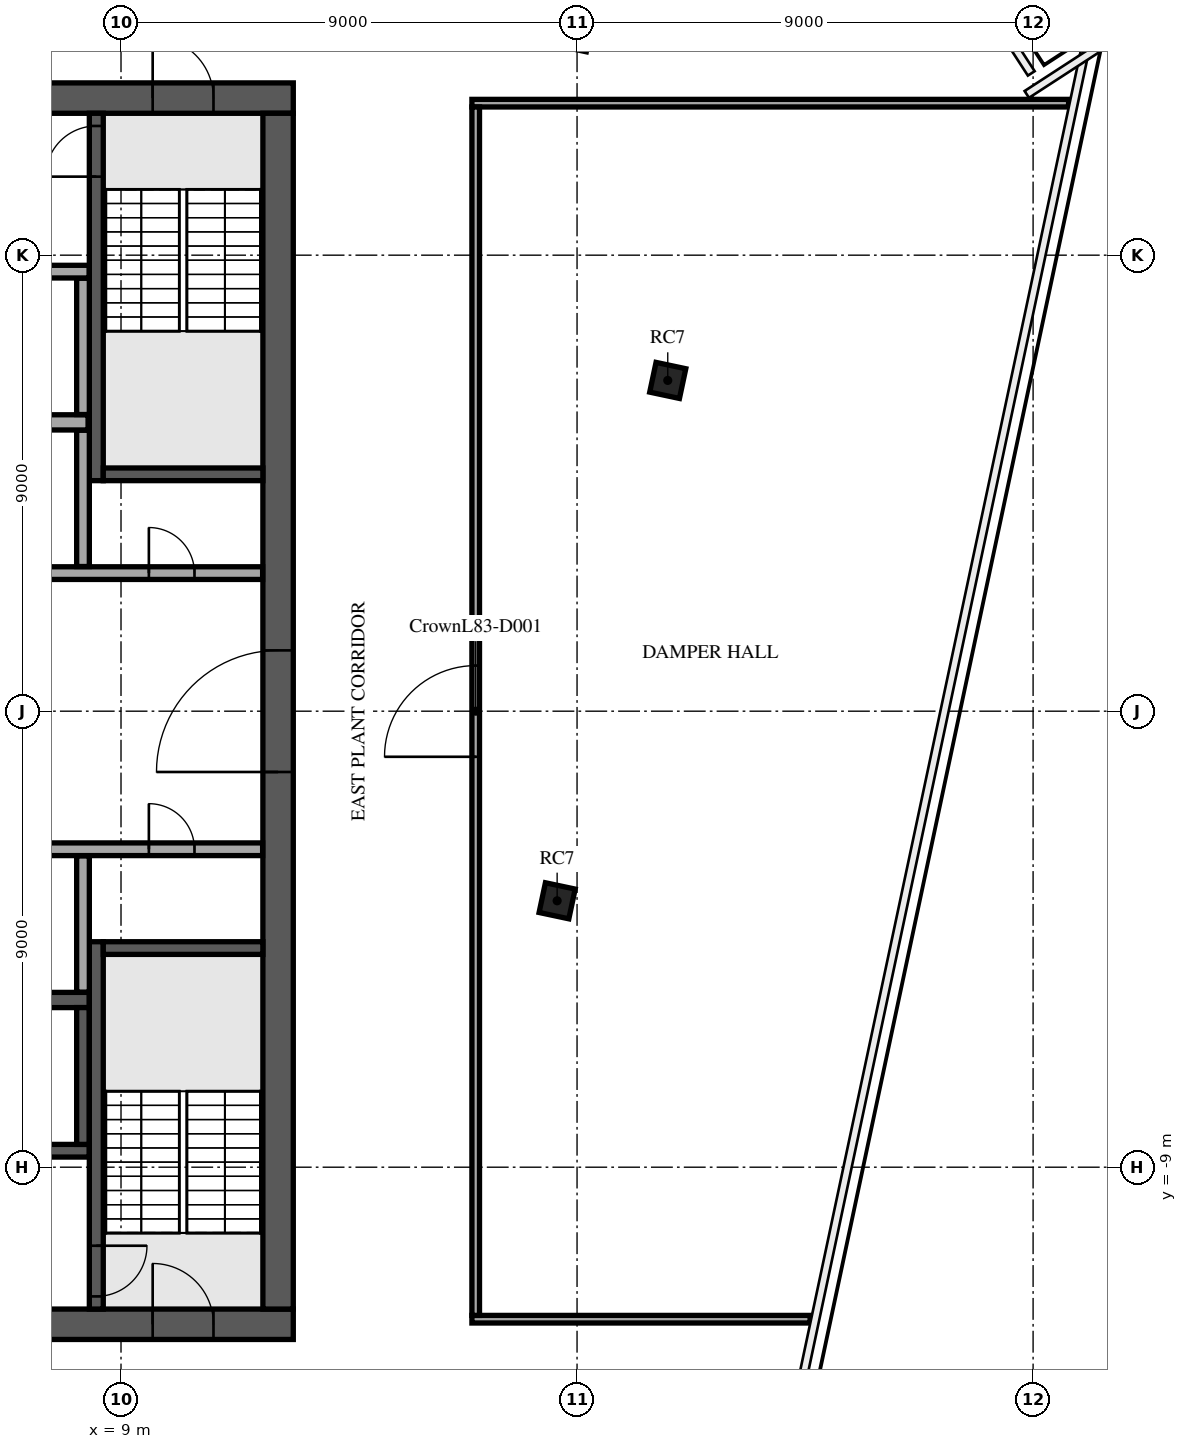
"""IFC4 building model, lengths in metres.
Left out: names, types, materials, properties, quantities, classifications, styles, units other than length and angle.
Written with IfcOpenShell. Run it as: python <this file> out.ifc"""

import sys

from ifc_helpers import new_model, si_unit, direction, frame, frame_2d, origin, origin_2d, place, context, subcontext, project, spatial, rectangle, extrude, element, fill, save


model = new_model("IFC4")
c1 = context("Model", 3, precision=1e-05, world=origin(), true_north=direction((0.0, 1.0)))
c2 = subcontext(c1, "Body", "Model", "MODEL_VIEW")
j1 = project(units=[si_unit("LENGTHUNIT", "METRE"), si_unit("PLANEANGLEUNIT", "RADIAN")], contexts=[c1])
p1 = place(None, origin())
s1 = spatial("IfcSite", under=j1, at=p1, CompositionType="ELEMENT")
p2 = place(p1, origin())
s2 = spatial("IfcBuilding", under=s1, at=p2, CompositionType="ELEMENT")
p3 = place(p2, frame((0.0, 0.0, 350.1)))
s3 = spatial("IfcBuildingStorey", under=s2, at=p3, CompositionType="ELEMENT", Elevation=350.1)
for number, where, z_axis, x_axis in (
    (1, (17.607, -3.742, -0.3), (0.0, 0.0, 1.0), (0.208, 0.978, 0.0)),
    (2, (19.79, 6.528, -0.3), (0.0, 0.0, 1.0), (0.208, 0.978, 0.0)),
):
    element("IfcColumn", number, at=place(p3, frame(where, z_axis=z_axis, x_axis=x_axis)), inside=s3, PredefinedType="COLUMN", context=c2, shape_type="SweptSolid", body=[
        extrude(rectangle(XDim=0.6, YDim=0.6, at=origin_2d()), origin(), (0.0, 0.0, 1.0), 8.3),
    ])
p4 = place(p3, frame((-12.4, 12.1, 0.0), z_axis=(0.0, 0.0, 1.0), x_axis=(1.0, 0.0, 0.0)))
e3 = element("IfcWall", 3, at=p4, inside=s3, PredefinedType="SHEAR", context=c2, shape_type="SweptSolid", body=[
    extrude(rectangle(XDim=24.8, YDim=0.6, at=frame_2d((12.4, 0.0))), origin(), (0.0, 0.0, 1.0), 7.7),
])
p5 = place(p4, frame((11.2, 0.0, 0.0)))
e4 = element("IfcOpeningElement", 4, at=p5, cuts=e3, PredefinedType="OPENING", context=c2, shape_type="SweptSolid", body=[
    extrude(rectangle(XDim=2.4, YDim=2.4, at=frame_2d((1.2, 1.2))), frame((0.0, 0.31, 0.0), z_axis=(0.0, -1.0, 0.0), x_axis=(1.0, 0.0, 0.0)), (0.0, 0.0, 1.0), 0.62),
])
p6 = place(p4, frame((22.025, 0.0, 0.0)))
e5 = element("IfcOpeningElement", 5, at=p6, cuts=e3, PredefinedType="OPENING", context=c2, shape_type="SweptSolid", body=[
    extrude(rectangle(XDim=1.2, YDim=2.1, at=frame_2d((0.6, 1.05))), frame((0.0, 0.31, 0.0), z_axis=(0.0, -1.0, 0.0), x_axis=(1.0, 0.0, 0.0)), (0.0, 0.0, 1.0), 0.62),
])
p7 = place(p4, frame((1.0, 0.0, 0.0)))
e6 = element("IfcOpeningElement", 6, at=p7, cuts=e3, PredefinedType="OPENING", context=c2, shape_type="SweptSolid", body=[
    extrude(rectangle(XDim=1.0, YDim=2.1, at=frame_2d((0.5, 1.05))), frame((0.0, 0.31, 0.0), z_axis=(0.0, -1.0, 0.0), x_axis=(1.0, 0.0, 0.0)), (0.0, 0.0, 1.0), 0.62),
])
p8 = place(p3, frame((-12.4, -12.1, 0.0), z_axis=(0.0, 0.0, 1.0), x_axis=(1.0, 0.0, 0.0)))
e7 = element("IfcWall", 7, at=p8, inside=s3, PredefinedType="SHEAR", context=c2, shape_type="SweptSolid", body=[
    extrude(rectangle(XDim=24.8, YDim=0.6, at=frame_2d((12.4, 0.0))), origin(), (0.0, 0.0, 1.0), 7.7),
])
p9 = place(p8, frame((7.3, 0.0, 0.0)))
e8 = element("IfcOpeningElement", 8, at=p9, cuts=e7, PredefinedType="OPENING", context=c2, shape_type="SweptSolid", body=[
    extrude(rectangle(XDim=2.0, YDim=2.1, at=frame_2d((1.0, 1.05))), frame((0.0, 0.31, 0.0), z_axis=(0.0, -1.0, 0.0), x_axis=(1.0, 0.0, 0.0)), (0.0, 0.0, 1.0), 0.62),
])
p10 = place(p8, frame((17.425, 0.0, 0.0)))
e9 = element("IfcOpeningElement", 9, at=p10, cuts=e7, PredefinedType="OPENING", context=c2, shape_type="SweptSolid", body=[
    extrude(rectangle(XDim=1.2, YDim=2.1, at=frame_2d((0.6, 1.05))), frame((0.0, 0.31, 0.0), z_axis=(0.0, -1.0, 0.0), x_axis=(1.0, 0.0, 0.0)), (0.0, 0.0, 1.0), 0.62),
])
p11 = place(p8, frame((1.575, 0.0, 0.0)))
e10 = element("IfcOpeningElement", 10, at=p11, cuts=e7, PredefinedType="OPENING", context=c2, shape_type="SweptSolid", body=[
    extrude(rectangle(XDim=1.2, YDim=2.1, at=frame_2d((0.6, 1.05))), frame((0.0, 0.31, 0.0), z_axis=(0.0, -1.0, 0.0), x_axis=(1.0, 0.0, 0.0)), (0.0, 0.0, 1.0), 0.62),
])
p12 = place(p8, frame((22.025, 0.0, 0.0)))
e11 = element("IfcOpeningElement", 11, at=p12, cuts=e7, PredefinedType="OPENING", context=c2, shape_type="SweptSolid", body=[
    extrude(rectangle(XDim=1.2, YDim=2.1, at=frame_2d((0.6, 1.05))), frame((0.0, 0.31, 0.0), z_axis=(0.0, -1.0, 0.0), x_axis=(1.0, 0.0, 0.0)), (0.0, 0.0, 1.0), 0.62),
])
p13 = place(p3, frame((12.1, -11.8, 0.0), z_axis=(0.0, 0.0, 1.0), x_axis=(0.0, 1.0, 0.0)))
e12 = element("IfcWall", 12, at=p13, inside=s3, PredefinedType="SHEAR", context=c2, shape_type="SweptSolid", body=[
    extrude(rectangle(XDim=23.6, YDim=0.6, at=frame_2d((11.8, 0.0))), origin(), (0.0, 0.0, 1.0), 7.7),
])
p14 = place(p13, frame((10.6, 0.0, 0.0)))
e13 = element("IfcOpeningElement", 13, at=p14, cuts=e12, PredefinedType="OPENING", context=c2, shape_type="SweptSolid", body=[
    extrude(rectangle(XDim=2.4, YDim=2.4, at=frame_2d((1.2, 1.2))), frame((0.0, 0.31, 0.0), z_axis=(0.0, -1.0, 0.0), x_axis=(1.0, 0.0, 0.0)), (0.0, 0.0, 1.0), 0.62),
])
p15 = place(p3, frame((-2.875, -5.7, 0.0), z_axis=(0.0, 0.0, 1.0), x_axis=(1.0, 0.0, 0.0)))
e14 = element("IfcWall", 14, at=p15, inside=s3, PredefinedType="SOLIDWALL", context=c2, shape_type="SweptSolid", body=[
    extrude(rectangle(XDim=11.25, YDim=0.3, at=frame_2d((5.625, 0.0))), origin(), (0.0, 0.0, 1.0), 7.7),
])
p16 = place(p3, frame((-2.875, -8.675, 0.0), z_axis=(0.0, 0.0, 1.0), x_axis=(1.0, 0.0, 0.0)))
e15 = element("IfcWall", 15, at=p16, inside=s3, PredefinedType="SOLIDWALL", context=c2, shape_type="SweptSolid", body=[
    extrude(rectangle(XDim=11.25, YDim=0.25, at=frame_2d((5.625, 0.0))), origin(), (0.0, 0.0, 1.0), 7.7),
])
p17 = place(p16, frame((0.9, 0.0, 0.0)))
e16 = element("IfcOpeningElement", 16, at=p17, cuts=e15, PredefinedType="OPENING", context=c2, shape_type="SweptSolid", body=[
    extrude(rectangle(XDim=1.2, YDim=2.1, at=frame_2d((0.6, 1.05))), frame((0.0, 0.135, 0.0), z_axis=(0.0, -1.0, 0.0), x_axis=(1.0, 0.0, 0.0)), (0.0, 0.0, 1.0), 0.27),
])
p18 = place(p16, frame((3.65, 0.0, 0.0)))
e17 = element("IfcOpeningElement", 17, at=p18, cuts=e15, PredefinedType="OPENING", context=c2, shape_type="SweptSolid", body=[
    extrude(rectangle(XDim=1.2, YDim=2.1, at=frame_2d((0.6, 1.05))), frame((0.0, 0.135, 0.0), z_axis=(0.0, -1.0, 0.0), x_axis=(1.0, 0.0, 0.0)), (0.0, 0.0, 1.0), 0.27),
])
p19 = place(p16, frame((6.4, 0.0, 0.0)))
e18 = element("IfcOpeningElement", 18, at=p19, cuts=e15, PredefinedType="OPENING", context=c2, shape_type="SweptSolid", body=[
    extrude(rectangle(XDim=1.2, YDim=2.1, at=frame_2d((0.6, 1.05))), frame((0.0, 0.135, 0.0), z_axis=(0.0, -1.0, 0.0), x_axis=(1.0, 0.0, 0.0)), (0.0, 0.0, 1.0), 0.27),
])
p20 = place(p16, frame((9.15, 0.0, 0.0)))
e19 = element("IfcOpeningElement", 19, at=p20, cuts=e15, PredefinedType="OPENING", context=c2, shape_type="SweptSolid", body=[
    extrude(rectangle(XDim=1.2, YDim=2.1, at=frame_2d((0.6, 1.05))), frame((0.0, 0.135, 0.0), z_axis=(0.0, -1.0, 0.0), x_axis=(1.0, 0.0, 0.0)), (0.0, 0.0, 1.0), 0.27),
])
p21 = place(p3, frame((8.25, -8.55, 0.0), z_axis=(0.0, 0.0, 1.0), x_axis=(0.0, 1.0, 0.0)))
e20 = element("IfcWall", 20, at=p21, inside=s3, PredefinedType="SOLIDWALL", context=c2, shape_type="SweptSolid", body=[
    extrude(rectangle(XDim=2.7, YDim=0.25, at=frame_2d((1.35, 0.0))), origin(), (0.0, 0.0, 1.0), 7.7),
])
p22 = place(p3, frame((8.512, 4.55, 0.0), z_axis=(0.0, 0.0, 1.0), x_axis=(0.0, 1.0, 0.0)))
e21 = element("IfcWall", 21, at=p22, inside=s3, PredefinedType="SOLIDWALL", context=c2, shape_type="SweptSolid", body=[
    extrude(rectangle(XDim=7.25, YDim=0.275, at=frame_2d((3.625, 0.0))), origin(), (0.0, 0.0, 1.0), 7.7),
])
p23 = place(p22, frame((6.0, 0.0, 0.0)))
e22 = element("IfcOpeningElement", 22, at=p23, cuts=e21, PredefinedType="OPENING", context=c2, shape_type="SweptSolid", body=[
    extrude(rectangle(XDim=1.0, YDim=2.1, at=frame_2d((0.5, 1.05))), frame((0.0, 0.147, 0.0), z_axis=(0.0, -1.0, 0.0), x_axis=(1.0, 0.0, 0.0)), (0.0, 0.0, 1.0), 0.295),
])
p24 = place(p3, frame((8.65, 4.675, 0.0), z_axis=(0.0, 0.0, 1.0), x_axis=(1.0, 0.0, 0.0)))
e23 = element("IfcWall", 23, at=p24, inside=s3, PredefinedType="SOLIDWALL", context=c2, shape_type="SweptSolid", body=[
    extrude(rectangle(XDim=3.15, YDim=0.25, at=frame_2d((1.575, 0.0))), origin(), (0.0, 0.0, 1.0), 7.7),
])
p25 = place(p3, frame((8.512, -4.55, 0.0), z_axis=(0.0, 0.0, 1.0), x_axis=(0.0, -1.0, 0.0)))
e24 = element("IfcWall", 24, at=p25, inside=s3, PredefinedType="SOLIDWALL", context=c2, shape_type="SweptSolid", body=[
    extrude(rectangle(XDim=7.25, YDim=0.275, at=frame_2d((3.625, 0.0))), origin(), (0.0, 0.0, 1.0), 7.7),
])
p26 = place(p25, frame((6.0, 0.0, 0.0)))
e25 = element("IfcOpeningElement", 25, at=p26, cuts=e24, PredefinedType="OPENING", context=c2, shape_type="SweptSolid", body=[
    extrude(rectangle(XDim=1.0, YDim=2.1, at=frame_2d((0.5, 1.05))), frame((0.0, 0.147, 0.0), z_axis=(0.0, -1.0, 0.0), x_axis=(1.0, 0.0, 0.0)), (0.0, 0.0, 1.0), 0.295),
])
p27 = place(p3, frame((8.65, -4.675, 0.0), z_axis=(0.0, 0.0, 1.0), x_axis=(1.0, 0.0, 0.0)))
e26 = element("IfcWall", 26, at=p27, inside=s3, PredefinedType="SOLIDWALL", context=c2, shape_type="SweptSolid", body=[
    extrude(rectangle(XDim=3.15, YDim=0.25, at=frame_2d((1.575, 0.0))), origin(), (0.0, 0.0, 1.0), 7.7),
])
p28 = place(p3, frame((8.25, -5.545, 0.0), z_axis=(0.0, 0.0, 1.0), x_axis=(0.0, 1.0, 0.0)))
e27 = element("IfcWall", 27, at=p28, inside=s3, PredefinedType="PARTITIONING", context=c2, shape_type="SweptSolid", body=[
    extrude(rectangle(XDim=2.69, YDim=0.25, at=frame_2d((1.345, 0.0))), origin(), (0.0, 0.0, 1.0), 7.7),
])
p29 = place(p3, frame((5.63, -2.725, 0.0), z_axis=(0.0, 0.0, 1.0), x_axis=(1.0, 0.0, 0.0)))
e28 = element("IfcWall", 28, at=p29, inside=s3, PredefinedType="PARTITIONING", context=c2, shape_type="SweptSolid", body=[
    extrude(rectangle(XDim=6.165, YDim=0.25, at=frame_2d((3.083, 0.0))), origin(), (0.0, 0.0, 1.0), 7.7),
])
p30 = place(p29, frame((0.745, 0.0, 0.0)))
e29 = element("IfcOpeningElement", 29, at=p30, cuts=e28, PredefinedType="OPENING", context=c2, shape_type="SweptSolid", body=[
    extrude(rectangle(XDim=1.0, YDim=2.1, at=frame_2d((0.5, 1.05))), frame((0.0, 0.135, 0.0), z_axis=(0.0, -1.0, 0.0), x_axis=(1.0, 0.0, 0.0)), (0.0, 0.0, 1.0), 0.27),
])
p31 = place(p29, frame((3.92, 0.0, 0.0)))
e30 = element("IfcOpeningElement", 30, at=p31, cuts=e28, PredefinedType="OPENING", context=c2, shape_type="SweptSolid", body=[
    extrude(rectangle(XDim=0.9, YDim=2.1, at=frame_2d((0.45, 1.05))), frame((0.0, 0.135, 0.0), z_axis=(0.0, -1.0, 0.0), x_axis=(1.0, 0.0, 0.0)), (0.0, 0.0, 1.0), 0.27),
])
p32 = place(p3, frame((-11.795, 2.725, 0.0), z_axis=(0.0, 0.0, 1.0), x_axis=(1.0, 0.0, 0.0)))
e31 = element("IfcWall", 31, at=p32, inside=s3, PredefinedType="PARTITIONING", context=c2, shape_type="SweptSolid", body=[
    extrude(rectangle(XDim=23.59, YDim=0.25, at=frame_2d((11.795, 0.0))), origin(), (0.0, 0.0, 1.0), 7.7),
])
p33 = place(p32, frame((21.345, 0.0, 0.0)))
e32 = element("IfcOpeningElement", 32, at=p33, cuts=e31, PredefinedType="OPENING", context=c2, shape_type="SweptSolid", body=[
    extrude(rectangle(XDim=0.9, YDim=2.1, at=frame_2d((0.45, 1.05))), frame((0.0, 0.135, 0.0), z_axis=(0.0, -1.0, 0.0), x_axis=(1.0, 0.0, 0.0)), (0.0, 0.0, 1.0), 0.27),
])
p34 = place(p32, frame((1.345, 0.0, 0.0)))
e33 = element("IfcOpeningElement", 33, at=p34, cuts=e31, PredefinedType="OPENING", context=c2, shape_type="SweptSolid", body=[
    extrude(rectangle(XDim=0.9, YDim=2.1, at=frame_2d((0.45, 1.05))), frame((0.0, 0.135, 0.0), z_axis=(0.0, -1.0, 0.0), x_axis=(1.0, 0.0, 0.0)), (0.0, 0.0, 1.0), 0.27),
])
p35 = place(p32, frame((4.42, 0.0, 0.0)))
e34 = element("IfcOpeningElement", 34, at=p35, cuts=e31, PredefinedType="OPENING", context=c2, shape_type="SweptSolid", body=[
    extrude(rectangle(XDim=1.0, YDim=2.1, at=frame_2d((0.5, 1.05))), frame((0.0, 0.135, 0.0), z_axis=(0.0, -1.0, 0.0), x_axis=(1.0, 0.0, 0.0)), (0.0, 0.0, 1.0), 0.27),
])
p36 = place(p32, frame((7.17, 0.0, 0.0)))
e35 = element("IfcOpeningElement", 35, at=p36, cuts=e31, PredefinedType="OPENING", context=c2, shape_type="SweptSolid", body=[
    extrude(rectangle(XDim=1.0, YDim=2.1, at=frame_2d((0.5, 1.05))), frame((0.0, 0.135, 0.0), z_axis=(0.0, -1.0, 0.0), x_axis=(1.0, 0.0, 0.0)), (0.0, 0.0, 1.0), 0.27),
])
p37 = place(p32, frame((12.57, 0.0, 0.0)))
e36 = element("IfcOpeningElement", 36, at=p37, cuts=e31, PredefinedType="OPENING", context=c2, shape_type="SweptSolid", body=[
    extrude(rectangle(XDim=1.2, YDim=2.1, at=frame_2d((0.6, 1.05))), frame((0.0, 0.135, 0.0), z_axis=(0.0, -1.0, 0.0), x_axis=(1.0, 0.0, 0.0)), (0.0, 0.0, 1.0), 0.27),
])
p38 = place(p3, frame((8.25, 2.855, 0.0), z_axis=(0.0, 0.0, 1.0), x_axis=(0.0, 1.0, 0.0)))
e37 = element("IfcWall", 37, at=p38, inside=s3, PredefinedType="PARTITIONING", context=c2, shape_type="SweptSolid", body=[
    extrude(rectangle(XDim=2.69, YDim=0.25, at=frame_2d((1.345, 0.0))), origin(), (0.0, 0.0, 1.0), 7.7),
])
p39 = place(p3, frame((-8.35, 5.7, 0.0), z_axis=(0.0, 0.0, 1.0), x_axis=(1.0, 0.0, 0.0)))
e38 = element("IfcWall", 38, at=p39, inside=s3, PredefinedType="PARTITIONING", context=c2, shape_type="SweptSolid", body=[
    extrude(rectangle(XDim=16.7, YDim=0.3, at=frame_2d((8.35, 0.0))), origin(), (0.0, 0.0, 1.0), 7.7),
])
p40 = place(p3, frame((8.25, 5.855, 0.0), z_axis=(0.0, 0.0, 1.0), x_axis=(0.0, 1.0, 0.0)))
e39 = element("IfcWall", 39, at=p40, inside=s3, PredefinedType="PARTITIONING", context=c2, shape_type="SweptSolid", body=[
    extrude(rectangle(XDim=2.69, YDim=0.25, at=frame_2d((1.345, 0.0))), origin(), (0.0, 0.0, 1.0), 7.7),
])
p41 = place(p3, frame((-8.35, 8.675, 0.0), z_axis=(0.0, 0.0, 1.0), x_axis=(1.0, 0.0, 0.0)))
e40 = element("IfcWall", 40, at=p41, inside=s3, PredefinedType="PARTITIONING", context=c2, shape_type="SweptSolid", body=[
    extrude(rectangle(XDim=16.72, YDim=0.25, at=frame_2d((8.36, 0.0))), origin(), (0.0, 0.0, 1.0), 7.7),
])
p42 = place(p41, frame((0.975, 0.0, 0.0)))
e41 = element("IfcOpeningElement", 41, at=p42, cuts=e40, PredefinedType="OPENING", context=c2, shape_type="SweptSolid", body=[
    extrude(rectangle(XDim=1.0, YDim=2.1, at=frame_2d((0.5, 1.05))), frame((0.0, 0.135, 0.0), z_axis=(0.0, -1.0, 0.0), x_axis=(1.0, 0.0, 0.0)), (0.0, 0.0, 1.0), 0.27),
])
p43 = place(p41, frame((3.725, 0.0, 0.0)))
e42 = element("IfcOpeningElement", 42, at=p43, cuts=e40, PredefinedType="OPENING", context=c2, shape_type="SweptSolid", body=[
    extrude(rectangle(XDim=1.0, YDim=2.1, at=frame_2d((0.5, 1.05))), frame((0.0, 0.135, 0.0), z_axis=(0.0, -1.0, 0.0), x_axis=(1.0, 0.0, 0.0)), (0.0, 0.0, 1.0), 0.27),
])
p44 = place(p41, frame((9.125, 0.0, 0.0)))
e43 = element("IfcOpeningElement", 43, at=p44, cuts=e40, PredefinedType="OPENING", context=c2, shape_type="SweptSolid", body=[
    extrude(rectangle(XDim=1.2, YDim=2.1, at=frame_2d((0.6, 1.05))), frame((0.0, 0.135, 0.0), z_axis=(0.0, -1.0, 0.0), x_axis=(1.0, 0.0, 0.0)), (0.0, 0.0, 1.0), 0.27),
])
p45 = place(p3, frame((15.925, -12.0, 0.0), z_axis=(0.0, 0.0, 1.0), x_axis=(1.0, 0.0, 0.0)))
e44 = element("IfcWall", 44, at=p45, inside=s3, PredefinedType="PARTITIONING", context=c2, shape_type="SweptSolid", body=[
    extrude(rectangle(XDim=6.674, YDim=0.15, at=frame_2d((3.337, 0.0))), origin(), (0.0, 0.0, 1.0), 7.7),
])
p46 = place(p3, frame((15.925, 12.0, 0.0), z_axis=(0.0, 0.0, 1.0), x_axis=(1.0, 0.0, 0.0)))
e45 = element("IfcWall", 45, at=p46, inside=s3, PredefinedType="PARTITIONING", context=c2, shape_type="SweptSolid", body=[
    extrude(rectangle(XDim=11.775, YDim=0.15, at=frame_2d((5.888, 0.0))), origin(), (0.0, 0.0, 1.0), 7.7),
])
p47 = place(p3, frame((16.0, -11.925, 0.0), z_axis=(0.0, 0.0, 1.0), x_axis=(0.0, 1.0, 0.0)))
e46 = element("IfcWall", 46, at=p47, inside=s3, PredefinedType="PARTITIONING", context=c2, shape_type="SweptSolid", body=[
    extrude(rectangle(XDim=23.85, YDim=0.15, at=frame_2d((11.925, 0.0))), origin(), (0.0, 0.0, 1.0), 7.32),
])
p48 = place(p47, frame((11.025, 0.0, 0.0)))
e47 = element("IfcOpeningElement", 47, at=p48, cuts=e46, PredefinedType="OPENING", context=c2, shape_type="SweptSolid", body=[
    extrude(rectangle(XDim=1.8, YDim=2.1, at=frame_2d((0.9, 1.05))), frame((0.0, 0.085, 0.0), z_axis=(0.0, -1.0, 0.0), x_axis=(1.0, 0.0, 0.0)), (0.0, 0.0, 1.0), 0.17),
])
p49 = place(p6, origin())
e48 = element("IfcDoor", 48, at=p49, inside=s3, OperationType="SINGLE_SWING_LEFT", PredefinedType="DOOR", context=c2, shape_type="SweptSolid", body=[
    extrude(rectangle(XDim=1.2, YDim=2.1, at=frame_2d((0.6, 1.05))), frame((0.0, 0.025, 0.0), z_axis=(0.0, -1.0, 0.0), x_axis=(1.0, 0.0, 0.0)), (0.0, 0.0, 1.0), 0.05),
])
fill(e5, e48)
p50 = place(p12, origin())
e49 = element("IfcDoor", 49, at=p50, inside=s3, OperationType="SINGLE_SWING_LEFT", PredefinedType="DOOR", context=c2, shape_type="SweptSolid", body=[
    extrude(rectangle(XDim=1.2, YDim=2.1, at=frame_2d((0.6, 1.05))), frame((0.0, 0.025, 0.0), z_axis=(0.0, -1.0, 0.0), x_axis=(1.0, 0.0, 0.0)), (0.0, 0.0, 1.0), 0.05),
])
fill(e11, e49)
p51 = place(p14, origin())
e50 = element("IfcDoor", 50, at=p51, inside=s3, OperationType="SINGLE_SWING_LEFT", PredefinedType="DOOR", context=c2, shape_type="SweptSolid", body=[
    extrude(rectangle(XDim=2.4, YDim=2.4, at=frame_2d((1.2, 1.2))), frame((0.0, 0.025, 0.0), z_axis=(0.0, -1.0, 0.0), x_axis=(1.0, 0.0, 0.0)), (0.0, 0.0, 1.0), 0.05),
])
fill(e13, e50)
p52 = place(p23, origin())
e51 = element("IfcDoor", 51, at=p52, inside=s3, OperationType="SINGLE_SWING_LEFT", PredefinedType="DOOR", context=c2, shape_type="SweptSolid", body=[
    extrude(rectangle(XDim=1.0, YDim=2.1, at=frame_2d((0.5, 1.05))), frame((0.0, 0.025, 0.0), z_axis=(0.0, -1.0, 0.0), x_axis=(1.0, 0.0, 0.0)), (0.0, 0.0, 1.0), 0.05),
])
fill(e22, e51)
p53 = place(p26, origin())
e52 = element("IfcDoor", 52, at=p53, inside=s3, OperationType="SINGLE_SWING_LEFT", PredefinedType="DOOR", context=c2, shape_type="SweptSolid", body=[
    extrude(rectangle(XDim=1.0, YDim=2.1, at=frame_2d((0.5, 1.05))), frame((0.0, 0.025, 0.0), z_axis=(0.0, -1.0, 0.0), x_axis=(1.0, 0.0, 0.0)), (0.0, 0.0, 1.0), 0.05),
])
fill(e25, e52)
p54 = place(p33, origin())
e53 = element("IfcDoor", 53, at=p54, inside=s3, OperationType="SINGLE_SWING_RIGHT", PredefinedType="DOOR", context=c2, shape_type="SweptSolid", body=[
    extrude(rectangle(XDim=0.9, YDim=2.1, at=frame_2d((0.45, 1.05))), frame((0.0, 0.025, 0.0), z_axis=(0.0, -1.0, 0.0), x_axis=(1.0, 0.0, 0.0)), (0.0, 0.0, 1.0), 0.05),
])
fill(e32, e53)
p55 = place(p31, origin())
e54 = element("IfcDoor", 54, at=p55, inside=s3, OperationType="SINGLE_SWING_RIGHT", PredefinedType="DOOR", context=c2, shape_type="SweptSolid", body=[
    extrude(rectangle(XDim=0.9, YDim=2.1, at=frame_2d((0.45, 1.05))), frame((0.0, 0.025, 0.0), z_axis=(0.0, -1.0, 0.0), x_axis=(1.0, 0.0, 0.0)), (0.0, 0.0, 1.0), 0.05),
])
fill(e30, e54)
p56 = place(p48, origin())
e55 = element("IfcDoor", 55, at=p56, inside=s3, OperationType="DOUBLE_DOOR_SINGLE_SWING", PredefinedType="DOOR", context=c2, shape_type="SweptSolid", body=[
    extrude(rectangle(XDim=1.8, YDim=2.1, at=frame_2d((0.9, 1.05))), frame((0.0, 0.025, 0.0), z_axis=(0.0, -1.0, 0.0), x_axis=(1.0, 0.0, 0.0)), (0.0, 0.0, 1.0), 0.05),
])
fill(e47, e55)
save(model, sys.argv[1])
